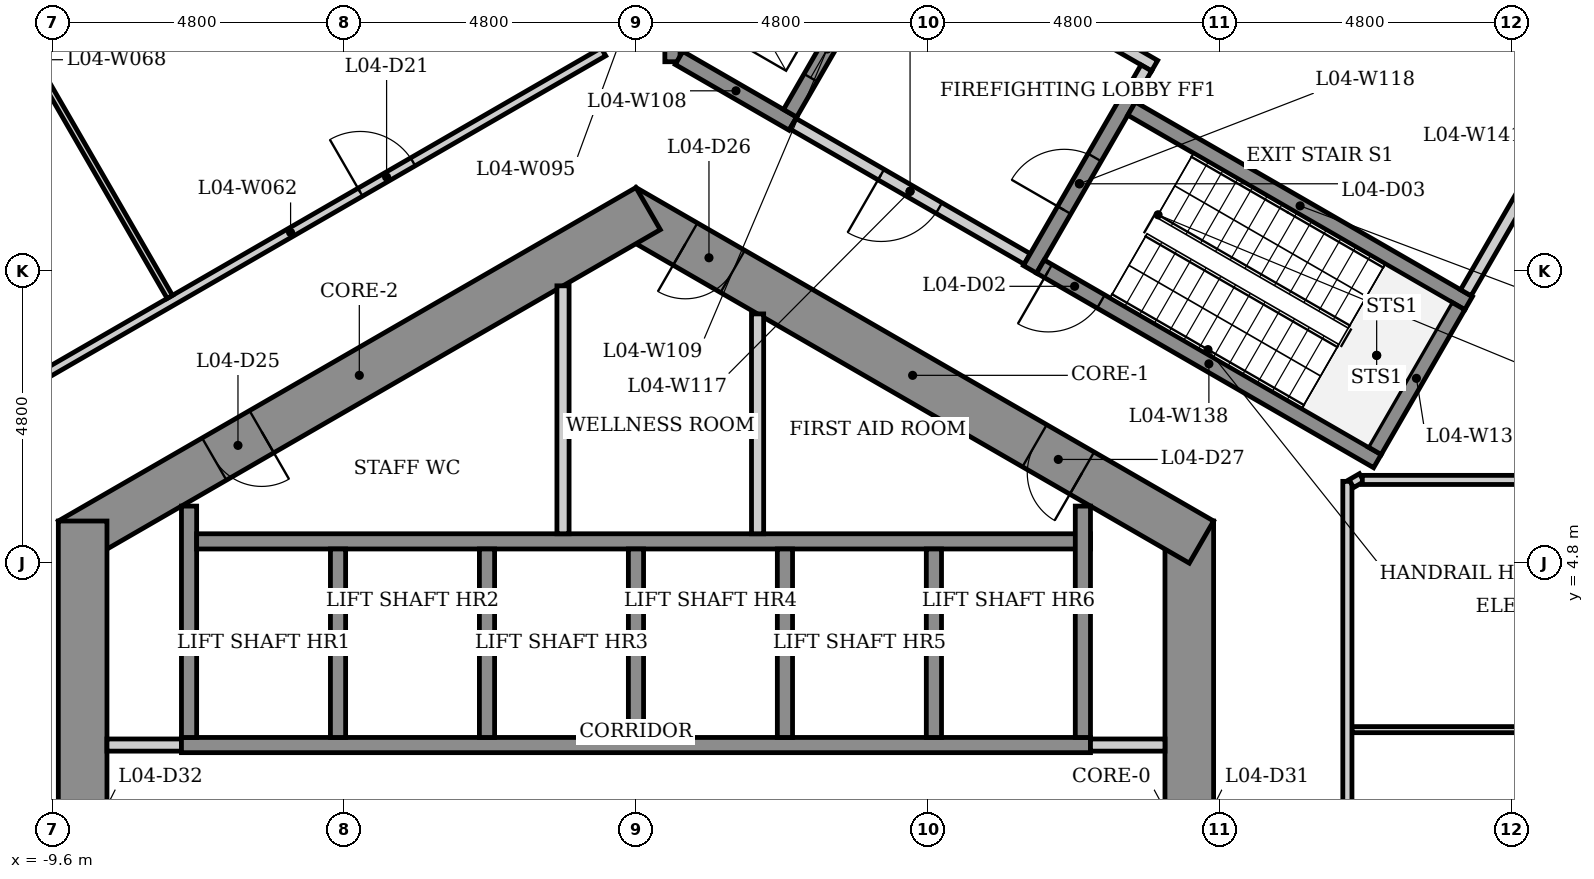
"""IFC4 building model, lengths in metres.
Left out: names, types, materials, properties, quantities, classifications, styles, units other than length and angle.
Written with IfcOpenShell. Run it as: python <this file> out.ifc"""

import sys

from ifc_helpers import new_model, si_unit, direction, frame, frame_2d, origin, place, context, subcontext, project, spatial, rectangle, extrude, element, fill, save


model = new_model("IFC4")
c1 = context("Model", 3, precision=1e-05, world=origin(), true_north=direction((0.0, 1.0)))
c2 = subcontext(c1, "Body", "Model", "MODEL_VIEW")
j1 = project(units=[si_unit("LENGTHUNIT", "METRE"), si_unit("PLANEANGLEUNIT", "RADIAN")], contexts=[c1])
p1 = place(None, origin())
s1 = spatial("IfcSite", under=j1, at=p1, CompositionType="ELEMENT")
p2 = place(p1, origin())
s2 = spatial("IfcBuilding", under=s1, at=p2, CompositionType="ELEMENT")
p3 = place(p2, frame((0.0, 0.0, 20.5)))
s3 = spatial("IfcBuildingStorey", under=s2, at=p3, CompositionType="ELEMENT", Elevation=20.5)
p4 = place(p3, frame((9.1, -5.485, 0.0), z_axis=(0.0, 0.0, 1.0), x_axis=(0.0, 1.0, 0.0)))
e1 = element("IfcWall", 1, at=p4, inside=s3, PredefinedType="SHEAR", context=c2, shape_type="SweptSolid", body=[
    extrude(rectangle(XDim=10.97, YDim=0.8, at=frame_2d((5.485, 0.0))), origin(), (0.0, 0.0, 1.0), 5.0),
])
p5 = place(p4, frame((4.685, 0.0, 0.0)))
e2 = element("IfcOpeningElement", 2, at=p5, cuts=e1, PredefinedType="OPENING", context=c2, shape_type="SweptSolid", body=[
    extrude(rectangle(XDim=1.6, YDim=2.1, at=frame_2d((0.8, 1.05))), frame((0.0, 0.41, 0.0), z_axis=(0.0, -1.0, 0.0), x_axis=(1.0, 0.0, 0.0)), (0.0, 0.0, 1.0), 0.82),
])
p6 = place(p3, frame((9.3, 5.138, 0.0), z_axis=(0.0, 0.0, 1.0), x_axis=(-0.866023993627, 0.500002442456, 0.0)))
e3 = element("IfcWall", 3, at=p6, inside=s3, PredefinedType="SHEAR", context=c2, shape_type="SweptSolid", body=[
    extrude(rectangle(XDim=10.97, YDim=0.8, at=frame_2d((5.485, 0.0))), origin(), (0.0, 0.0, 1.0), 5.0),
])
p7 = place(p6, frame((8.903, 0.0, 0.0)))
e4 = element("IfcOpeningElement", 4, at=p7, cuts=e3, PredefinedType="OPENING", context=c2, shape_type="SweptSolid", body=[
    extrude(rectangle(XDim=0.9, YDim=2.1, at=frame_2d((0.45, 1.05))), frame((0.0, 0.41, 0.0), z_axis=(0.0, -1.0, 0.0), x_axis=(1.0, 0.0, 0.0)), (0.0, 0.0, 1.0), 0.82),
])
p8 = place(p6, frame((2.269, 0.0, 0.0)))
e5 = element("IfcOpeningElement", 5, at=p8, cuts=e3, PredefinedType="OPENING", context=c2, shape_type="SweptSolid", body=[
    extrude(rectangle(XDim=0.9, YDim=2.1, at=frame_2d((0.45, 1.05))), frame((0.0, 0.41, 0.0), z_axis=(0.0, -1.0, 0.0), x_axis=(1.0, 0.0, 0.0)), (0.0, 0.0, 1.0), 0.82),
])
p9 = place(p3, frame((0.2, 10.623, 0.0), z_axis=(0.0, 0.0, 1.0), x_axis=(-0.866023993627, -0.500002442456, 0.0)))
e6 = element("IfcWall", 6, at=p9, inside=s3, PredefinedType="SHEAR", context=c2, shape_type="SweptSolid", body=[
    extrude(rectangle(XDim=10.97, YDim=0.8, at=frame_2d((5.485, 0.0))), origin(), (0.0, 0.0, 1.0), 5.0),
])
p10 = place(p9, frame((7.339, 0.0, 0.0)))
e7 = element("IfcOpeningElement", 7, at=p10, cuts=e6, PredefinedType="OPENING", context=c2, shape_type="SweptSolid", body=[
    extrude(rectangle(XDim=0.9, YDim=2.1, at=frame_2d((0.45, 1.05))), frame((0.0, 0.41, 0.0), z_axis=(0.0, -1.0, 0.0), x_axis=(1.0, 0.0, 0.0)), (0.0, 0.0, 1.0), 0.82),
])
p11 = place(p3, frame((-9.1, 5.485, 0.0), z_axis=(0.0, 0.0, 1.0), x_axis=(0.0, -1.0, 0.0)))
e8 = element("IfcWall", 8, at=p11, inside=s3, PredefinedType="SHEAR", context=c2, shape_type="SweptSolid", body=[
    extrude(rectangle(XDim=10.97, YDim=0.8, at=frame_2d((5.485, 0.0))), origin(), (0.0, 0.0, 1.0), 5.0),
])
p12 = place(p11, frame((4.685, 0.0, 0.0)))
e9 = element("IfcOpeningElement", 9, at=p12, cuts=e8, PredefinedType="OPENING", context=c2, shape_type="SweptSolid", body=[
    extrude(rectangle(XDim=1.6, YDim=2.1, at=frame_2d((0.8, 1.05))), frame((0.0, 0.41, 0.0), z_axis=(0.0, -1.0, 0.0), x_axis=(1.0, 0.0, 0.0)), (0.0, 0.0, 1.0), 0.82),
])
p13 = place(p3, frame((-10.825, 7.26, 0.0), z_axis=(0.0, 0.0, 1.0), x_axis=(0.866026819738, 0.499997547488, 0.0)))
e10 = element("IfcWall", 10, at=p13, inside=s3, PredefinedType="PARTITIONING", context=c2, shape_type="SweptSolid", body=[
    extrude(rectangle(XDim=11.882, YDim=0.15, at=frame_2d((5.941, 0.0))), origin(), (0.0, 0.0, 1.0), 4.65),
])
p14 = place(p13, frame((7.264, 0.0, 0.0)))
e11 = element("IfcOpeningElement", 11, at=p14, cuts=e10, PredefinedType="OPENING", context=c2, shape_type="SweptSolid", body=[
    extrude(rectangle(XDim=1.0, YDim=2.1, at=frame_2d((0.5, 1.05))), frame((0.0, 0.085, 0.0), z_axis=(0.0, -1.0, 0.0), x_axis=(1.0, 0.0, 0.0)), (0.0, 0.0, 1.0), 0.17),
])
p15 = place(p3, frame((-8.7, 1.8, 0.0), z_axis=(0.0, 0.0, 1.0), x_axis=(1.0, 0.0, 0.0)))
e12 = element("IfcWall", 12, at=p15, inside=s3, PredefinedType="PARTITIONING", context=c2, shape_type="SweptSolid", body=[
    extrude(rectangle(XDim=1.225, YDim=0.2, at=frame_2d((0.613, 0.0))), origin(), (0.0, 0.0, 1.0), 4.65),
])
p16 = place(p3, frame((-7.666, 9.171, 0.0), z_axis=(0.0, 0.0, 1.0), x_axis=(-0.500009404554, 0.866019973994, 0.0)))
e13 = element("IfcWall", 13, at=p16, inside=s3, PredefinedType="PARTITIONING", context=c2, shape_type="SweptSolid", body=[
    extrude(rectangle(XDim=9.01, YDim=0.1, at=frame_2d((4.505, 0.0))), origin(), (0.0, 0.0, 1.0), 4.65),
])
p17 = place(p3, frame((-7.475, 1.8, 0.0), z_axis=(0.0, 0.0, 1.0), x_axis=(1.0, 0.0, 0.0)))
e14 = element("IfcWall", 14, at=p17, inside=s3, PredefinedType="SHEAR", context=c2, shape_type="SweptSolid", body=[
    extrude(rectangle(XDim=14.95, YDim=0.25, at=frame_2d((7.475, 0.0))), origin(), (0.0, 0.0, 1.0), 4.65),
])
p18 = place(p3, frame((-7.35, 1.925, 0.0), z_axis=(0.0, 0.0, 1.0), x_axis=(0.0, 1.0, 0.0)))
e15 = element("IfcWall", 15, at=p18, inside=s3, PredefinedType="SHEAR", context=c2, shape_type="SweptSolid", body=[
    extrude(rectangle(XDim=3.805, YDim=0.25, at=frame_2d((1.903, 0.0))), origin(), (0.0, 0.0, 1.0), 4.65),
])
p19 = place(p3, frame((-7.225, 5.15, 0.0), z_axis=(0.0, 0.0, 1.0), x_axis=(1.0, 0.0, 0.0)))
e16 = element("IfcWall", 16, at=p19, inside=s3, PredefinedType="SHEAR", context=c2, shape_type="SweptSolid", body=[
    extrude(rectangle(XDim=14.7, YDim=0.25, at=frame_2d((7.35, 0.0))), origin(), (0.0, 0.0, 1.0), 4.65),
])
for number, where, z_axis, x_axis in (
    (17, (-4.9, 5.025, 0.0), (0.0, 0.0, 1.0), (0.0, -1.0, 0.0)),
    (18, (-2.45, 5.025, 0.0), (0.0, 0.0, 1.0), (0.0, -1.0, 0.0)),
):
    element("IfcWall", number, at=place(p3, frame(where, z_axis=z_axis, x_axis=x_axis)), inside=s3, PredefinedType="SHEAR", context=c2, shape_type="SweptSolid", body=[
        extrude(rectangle(XDim=3.1, YDim=0.25, at=frame_2d((1.55, 0.0))), origin(), (0.0, 0.0, 1.0), 5.0),
    ])
p20 = place(p3, frame((-1.2, 9.353, 0.0), z_axis=(0.0, 0.0, 1.0), x_axis=(0.0, -1.0, 0.0)))
e19 = element("IfcWall", 19, at=p20, inside=s3, PredefinedType="PARTITIONING", context=c2, shape_type="SweptSolid", body=[
    extrude(rectangle(XDim=4.078, YDim=0.2, at=frame_2d((2.039, 0.0))), origin(), (0.0, 0.0, 1.0), 4.65),
])
p21 = place(p3, frame((0.0, 5.025, 0.0), z_axis=(0.0, 0.0, 1.0), x_axis=(0.0, -1.0, 0.0)))
e20 = element("IfcWall", 20, at=p21, inside=s3, PredefinedType="SHEAR", context=c2, shape_type="SweptSolid", body=[
    extrude(rectangle(XDim=3.1, YDim=0.25, at=frame_2d((1.55, 0.0))), origin(), (0.0, 0.0, 1.0), 5.0),
])
p22 = place(p3, frame((0.6, 13.039, 0.0), z_axis=(0.0, 0.0, 1.0), x_axis=(0.0, 1.0, 0.0)))
e21 = element("IfcWall", 21, at=p22, inside=s3, PredefinedType="SHEAR", context=c2, shape_type="SweptSolid", body=[
    extrude(rectangle(XDim=0.896, YDim=0.25, at=frame_2d((0.448, 0.0))), origin(), (0.0, 0.0, 1.0), 4.65),
])
p23 = place(p3, frame((2.0, 8.891, 0.0), z_axis=(0.0, 0.0, 1.0), x_axis=(0.0, -1.0, 0.0)))
e22 = element("IfcWall", 22, at=p23, inside=s3, PredefinedType="PARTITIONING", context=c2, shape_type="SweptSolid", body=[
    extrude(rectangle(XDim=3.616, YDim=0.2, at=frame_2d((1.808, 0.0))), origin(), (0.0, 0.0, 1.0), 4.65),
])
p24 = place(p3, frame((2.45, 5.025, 0.0), z_axis=(0.0, 0.0, 1.0), x_axis=(0.0, -1.0, 0.0)))
e23 = element("IfcWall", 23, at=p24, inside=s3, PredefinedType="SHEAR", context=c2, shape_type="SweptSolid", body=[
    extrude(rectangle(XDim=3.1, YDim=0.25, at=frame_2d((1.55, 0.0))), origin(), (0.0, 0.0, 1.0), 5.0),
])
p25 = place(p3, frame((2.581, 12.02, 0.0), z_axis=(0.0, 0.0, 1.0), x_axis=(-0.86603892542, 0.499976579108, 0.0)))
e24 = element("IfcWall", 24, at=p25, inside=s3, PredefinedType="SHEAR", context=c2, shape_type="SweptSolid", body=[
    extrude(rectangle(XDim=2.162, YDim=0.25, at=frame_2d((1.081, 0.0))), origin(), (0.0, 0.0, 1.0), 4.65),
])
p26 = place(p3, frame((2.535, 12.191, 0.0), z_axis=(0.0, 0.0, 1.0), x_axis=(0.500061746146, 0.865989751695, 0.0)))
e25 = element("IfcWall", 25, at=p26, inside=s3, PredefinedType="SHEAR", context=c2, shape_type="SweptSolid", body=[
    extrude(rectangle(XDim=2.45, YDim=0.25, at=frame_2d((1.225, 0.0))), origin(), (0.0, 0.0, 1.0), 5.0),
])
p27 = place(p26, frame((0.675, 0.0, 0.0)))
e26 = element("IfcOpeningElement", 26, at=p27, cuts=e25, PredefinedType="OPENING", context=c2, shape_type="SweptSolid", body=[
    extrude(rectangle(XDim=1.1, YDim=2.1, at=frame_2d((0.55, 1.05))), frame((0.0, 0.135, 0.0), z_axis=(0.0, -1.0, 0.0), x_axis=(1.0, 0.0, 0.0)), (0.0, 0.0, 1.0), 0.27),
])
p28 = place(p3, frame((4.459, 15.323, 0.0), z_axis=(0.0, 0.0, 1.0), x_axis=(0.866016039709, -0.500016218704, 0.0)))
e27 = element("IfcWall", 27, at=p28, inside=s3, PredefinedType="PLUMBINGWALL", context=c2, shape_type="SweptSolid", body=[
    extrude(rectangle(XDim=4.7, YDim=0.2, at=frame_2d((2.35, 0.0))), origin(), (0.0, 0.0, 1.0), 4.65),
])
p29 = place(p3, frame((4.9, 5.025, 0.0), z_axis=(0.0, 0.0, 1.0), x_axis=(0.0, -1.0, 0.0)))
e28 = element("IfcWall", 28, at=p29, inside=s3, PredefinedType="SHEAR", context=c2, shape_type="SweptSolid", body=[
    extrude(rectangle(XDim=3.1, YDim=0.25, at=frame_2d((1.55, 0.0))), origin(), (0.0, 0.0, 1.0), 5.0),
])
p30 = place(p3, frame((6.435, 9.795, 0.0), z_axis=(0.0, 0.0, 1.0), x_axis=(-0.866012907634, 0.500021643343, 0.0)))
e29 = element("IfcWall", 29, at=p30, inside=s3, PredefinedType="PARTITIONING", context=c2, shape_type="SweptSolid", body=[
    extrude(rectangle(XDim=4.45, YDim=0.2, at=frame_2d((2.225, 0.0))), origin(), (0.0, 0.0, 1.0), 4.65),
])
p31 = place(p30, frame((1.675, 0.0, 0.0)))
e30 = element("IfcOpeningElement", 30, at=p31, cuts=e29, PredefinedType="OPENING", context=c2, shape_type="SweptSolid", body=[
    extrude(rectangle(XDim=1.1, YDim=2.1, at=frame_2d((0.55, 1.05))), frame((0.0, 0.11, 0.0), z_axis=(0.0, -1.0, 0.0), x_axis=(1.0, 0.0, 0.0)), (0.0, 0.0, 1.0), 0.22),
])
p32 = place(p3, frame((6.48, 9.624, 0.0), z_axis=(0.0, 0.0, 1.0), x_axis=(0.500017246033, 0.866015446554, 0.0)))
e31 = element("IfcWall", 31, at=p32, inside=s3, PredefinedType="SHEAR", context=c2, shape_type="SweptSolid", body=[
    extrude(rectangle(XDim=3.25, YDim=0.25, at=frame_2d((1.625, 0.0))), origin(), (0.0, 0.0, 1.0), 4.65),
])
p33 = place(p32, frame((1.125, 0.0, 0.0)))
e32 = element("IfcOpeningElement", 32, at=p33, cuts=e31, PredefinedType="OPENING", context=c2, shape_type="SweptSolid", body=[
    extrude(rectangle(XDim=1.0, YDim=2.1, at=frame_2d((0.5, 1.05))), frame((0.0, 0.135, 0.0), z_axis=(0.0, -1.0, 0.0), x_axis=(1.0, 0.0, 0.0)), (0.0, 0.0, 1.0), 0.27),
])
p34 = place(p3, frame((7.475, 1.8, 0.0), z_axis=(0.0, 0.0, 1.0), x_axis=(1.0, 0.0, 0.0)))
e33 = element("IfcWall", 33, at=p34, inside=s3, PredefinedType="PARTITIONING", context=c2, shape_type="SweptSolid", body=[
    extrude(rectangle(XDim=1.225, YDim=0.2, at=frame_2d((0.613, 0.0))), origin(), (0.0, 0.0, 1.0), 4.65),
])
p35 = place(p3, frame((7.35, 5.73, 0.0), z_axis=(0.0, 0.0, 1.0), x_axis=(0.0, -1.0, 0.0)))
e34 = element("IfcWall", 34, at=p35, inside=s3, PredefinedType="SHEAR", context=c2, shape_type="SweptSolid", body=[
    extrude(rectangle(XDim=3.805, YDim=0.25, at=frame_2d((1.903, 0.0))), origin(), (0.0, 0.0, 1.0), 4.65),
])
p36 = place(p3, frame((8.151, 12.268, 0.0), z_axis=(0.0, 0.0, 1.0), x_axis=(0.866025499775, -0.499999833739, 0.0)))
e35 = element("IfcWall", 35, at=p36, inside=s3, PredefinedType="SHEAR", context=c2, shape_type="SweptSolid", body=[
    extrude(rectangle(XDim=6.4, YDim=0.25, at=frame_2d((3.2, 0.0))), origin(), (0.0, 0.0, 1.0), 4.65),
])
p37 = place(p3, frame((8.393, 12.937, 0.0), z_axis=(0.0, 0.0, 1.0), x_axis=(-0.500065409566, -0.86598763626, 0.0)))
e36 = element("IfcWall", 36, at=p37, inside=s3, PredefinedType="PLUMBINGWALL", context=c2, shape_type="SweptSolid", body=[
    extrude(rectangle(XDim=0.575, YDim=0.2, at=frame_2d((0.288, 0.0))), origin(), (0.0, 0.0, 1.0), 4.65),
])
p38 = place(p3, frame((11.775, 2.054, 0.0), z_axis=(0.0, 0.0, 1.0), x_axis=(1.0, 0.0, 0.0)))
e37 = element("IfcWall", 37, at=p38, inside=s3, PredefinedType="PARTITIONING", context=c2, shape_type="SweptSolid", body=[
    extrude(rectangle(XDim=9.606, YDim=0.1, at=frame_2d((4.803, 0.0))), origin(), (0.0, 0.0, 1.0), 4.65),
])
p39 = place(p3, frame((11.7, -5.987, 0.0), z_axis=(0.0, 0.0, 1.0), x_axis=(0.0, 1.0, 0.0)))
e38 = element("IfcWall", 38, at=p39, inside=s3, PredefinedType="PARTITIONING", context=c2, shape_type="SweptSolid", body=[
    extrude(rectangle(XDim=12.125, YDim=0.15, at=frame_2d((6.062, 0.0))), origin(), (0.0, 0.0, 1.0), 4.65),
])
p40 = place(p39, frame((3.505, 0.0, 0.0)))
e39 = element("IfcOpeningElement", 39, at=p40, cuts=e38, PredefinedType="OPENING", context=c2, shape_type="SweptSolid", body=[
    extrude(rectangle(XDim=1.0, YDim=2.1, at=frame_2d((0.5, 1.05))), frame((0.0, 0.085, 0.0), z_axis=(0.0, -1.0, 0.0), x_axis=(1.0, 0.0, 0.0)), (0.0, 0.0, 1.0), 0.17),
])
p41 = place(p3, frame((11.936, 6.198, 0.0), z_axis=(0.0, 0.0, 1.0), x_axis=(-0.866103179807, -0.499865263774, 0.0)))
e40 = element("IfcWall", 40, at=p41, inside=s3, PredefinedType="PARTITIONING", context=c2, shape_type="SweptSolid", body=[
    extrude(rectangle(XDim=0.197, YDim=0.15, at=frame_2d((0.099, 0.0))), origin(), (0.0, 0.0, 1.0), 4.65),
])
p42 = place(p3, frame((12.194, 6.47, 0.0), z_axis=(0.0, 0.0, 1.0), x_axis=(-0.866025499775, 0.499999833739, 0.0)))
e41 = element("IfcWall", 41, at=p42, inside=s3, PredefinedType="SHEAR", context=c2, shape_type="SweptSolid", body=[
    extrude(rectangle(XDim=6.4, YDim=0.25, at=frame_2d((3.2, 0.0))), origin(), (0.0, 0.0, 1.0), 4.65),
])
p43 = place(p42, frame((5.25, 0.0, 0.0)))
e42 = element("IfcOpeningElement", 42, at=p43, cuts=e41, PredefinedType="OPENING", context=c2, shape_type="SweptSolid", body=[
    extrude(rectangle(XDim=1.0, YDim=2.1, at=frame_2d((0.5, 1.05))), frame((0.0, 0.135, 0.0), z_axis=(0.0, -1.0, 0.0), x_axis=(1.0, 0.0, 0.0)), (0.0, 0.0, 1.0), 0.27),
])
p44 = place(p3, frame((13.523, 9.022, 0.0), z_axis=(0.0, 0.0, 1.0), x_axis=(-0.500034990121, -0.866005201286, 0.0)))
e43 = element("IfcWall", 43, at=p44, inside=s3, PredefinedType="SHEAR", context=c2, shape_type="SweptSolid", body=[
    extrude(rectangle(XDim=2.75, YDim=0.25, at=frame_2d((1.375, 0.0))), origin(), (0.0, 0.0, 1.0), 4.65),
])
p45 = place(p3, frame((13.648, 9.239, 0.0), z_axis=(0.0, 0.0, 1.0), x_axis=(0.499994325412, 0.866028679985, 0.0)))
e44 = element("IfcWall", 44, at=p45, inside=s3, PredefinedType="PLUMBINGWALL", context=c2, shape_type="SweptSolid", body=[
    extrude(rectangle(XDim=5.959, YDim=0.2, at=frame_2d((2.98, 0.0))), origin(), (0.0, 0.0, 1.0), 4.65),
])
p46 = place(p3, frame((18.695, 6.161, 0.0), z_axis=(0.0, 0.0, 1.0), x_axis=(-1.0, 0.0, 0.0)))
e45 = element("IfcWall", 45, at=p46, inside=s3, PredefinedType="PARTITIONING", context=c2, shape_type="SweptSolid", body=[
    extrude(rectangle(XDim=6.75, YDim=0.15, at=frame_2d((3.375, 0.0))), origin(), (0.0, 0.0, 1.0), 4.65),
])
p47 = place(p46, frame((2.875, 0.0, 0.0)))
e46 = element("IfcOpeningElement", 46, at=p47, cuts=e45, PredefinedType="OPENING", context=c2, shape_type="SweptSolid", body=[
    extrude(rectangle(XDim=1.0, YDim=2.1, at=frame_2d((0.5, 1.05))), frame((0.0, 0.085, 0.0), z_axis=(0.0, -1.0, 0.0), x_axis=(1.0, 0.0, 0.0)), (0.0, 0.0, 1.0), 0.17),
])
p48 = place(p43, origin())
e47 = element("IfcDoor", 47, at=p48, inside=s3, OperationType="SINGLE_SWING_RIGHT", PredefinedType="DOOR", context=c2, shape_type="SweptSolid", body=[
    extrude(rectangle(XDim=1.0, YDim=2.1, at=frame_2d((0.5, 1.05))), frame((0.0, 0.025, 0.0), z_axis=(0.0, -1.0, 0.0), x_axis=(1.0, 0.0, 0.0)), (0.0, 0.0, 1.0), 0.05),
])
fill(e42, e47)
p49 = place(p33, origin())
e48 = element("IfcDoor", 48, at=p49, inside=s3, OperationType="SINGLE_SWING_LEFT", PredefinedType="DOOR", context=c2, shape_type="SweptSolid", body=[
    extrude(rectangle(XDim=1.0, YDim=2.1, at=frame_2d((0.5, 1.05))), frame((0.0, 0.025, 0.0), z_axis=(0.0, -1.0, 0.0), x_axis=(1.0, 0.0, 0.0)), (0.0, 0.0, 1.0), 0.05),
])
fill(e32, e48)
p50 = place(p31, origin())
e49 = element("IfcDoor", 49, at=p50, inside=s3, OperationType="SINGLE_SWING_RIGHT", PredefinedType="DOOR", context=c2, shape_type="SweptSolid", body=[
    extrude(rectangle(XDim=1.1, YDim=2.1, at=frame_2d((0.55, 1.05))), frame((0.0, 0.025, 0.0), z_axis=(0.0, -1.0, 0.0), x_axis=(1.0, 0.0, 0.0)), (0.0, 0.0, 1.0), 0.05),
])
fill(e30, e49)
p51 = place(p27, origin())
e50 = element("IfcDoor", 50, at=p51, inside=s3, OperationType="SLIDING_TO_LEFT", PredefinedType="DOOR", context=c2, shape_type="SweptSolid", body=[
    extrude(rectangle(XDim=1.1, YDim=2.1, at=frame_2d((0.55, 1.05))), frame((0.0, 0.025, 0.0), z_axis=(0.0, -1.0, 0.0), x_axis=(1.0, 0.0, 0.0)), (0.0, 0.0, 1.0), 0.05),
])
fill(e26, e50)
p52 = place(p14, origin())
e51 = element("IfcDoor", 51, at=p52, inside=s3, OperationType="SINGLE_SWING_LEFT", PredefinedType="DOOR", context=c2, shape_type="SweptSolid", body=[
    extrude(rectangle(XDim=1.0, YDim=2.1, at=frame_2d((0.5, 1.05))), frame((0.0, 0.025, 0.0), z_axis=(0.0, -1.0, 0.0), x_axis=(1.0, 0.0, 0.0)), (0.0, 0.0, 1.0), 0.05),
])
fill(e11, e51)
p53 = place(p10, origin())
e52 = element("IfcDoor", 52, at=p53, inside=s3, OperationType="SINGLE_SWING_LEFT", PredefinedType="DOOR", context=c2, shape_type="SweptSolid", body=[
    extrude(rectangle(XDim=0.9, YDim=2.1, at=frame_2d((0.45, 1.05))), frame((0.0, 0.025, 0.0), z_axis=(0.0, -1.0, 0.0), x_axis=(1.0, 0.0, 0.0)), (0.0, 0.0, 1.0), 0.05),
])
fill(e7, e52)
p54 = place(p7, origin())
e53 = element("IfcDoor", 53, at=p54, inside=s3, OperationType="SINGLE_SWING_RIGHT", PredefinedType="DOOR", context=c2, shape_type="SweptSolid", body=[
    extrude(rectangle(XDim=0.9, YDim=2.1, at=frame_2d((0.45, 1.05))), frame((0.0, 0.025, 0.0), z_axis=(0.0, -1.0, 0.0), x_axis=(1.0, 0.0, 0.0)), (0.0, 0.0, 1.0), 0.05),
])
fill(e4, e53)
p55 = place(p8, origin())
e54 = element("IfcDoor", 54, at=p55, inside=s3, OperationType="SINGLE_SWING_LEFT", PredefinedType="DOOR", context=c2, shape_type="SweptSolid", body=[
    extrude(rectangle(XDim=0.9, YDim=2.1, at=frame_2d((0.45, 1.05))), frame((0.0, 0.025, 0.0), z_axis=(0.0, -1.0, 0.0), x_axis=(1.0, 0.0, 0.0)), (0.0, 0.0, 1.0), 0.05),
])
fill(e5, e54)
save(model, sys.argv[1])
